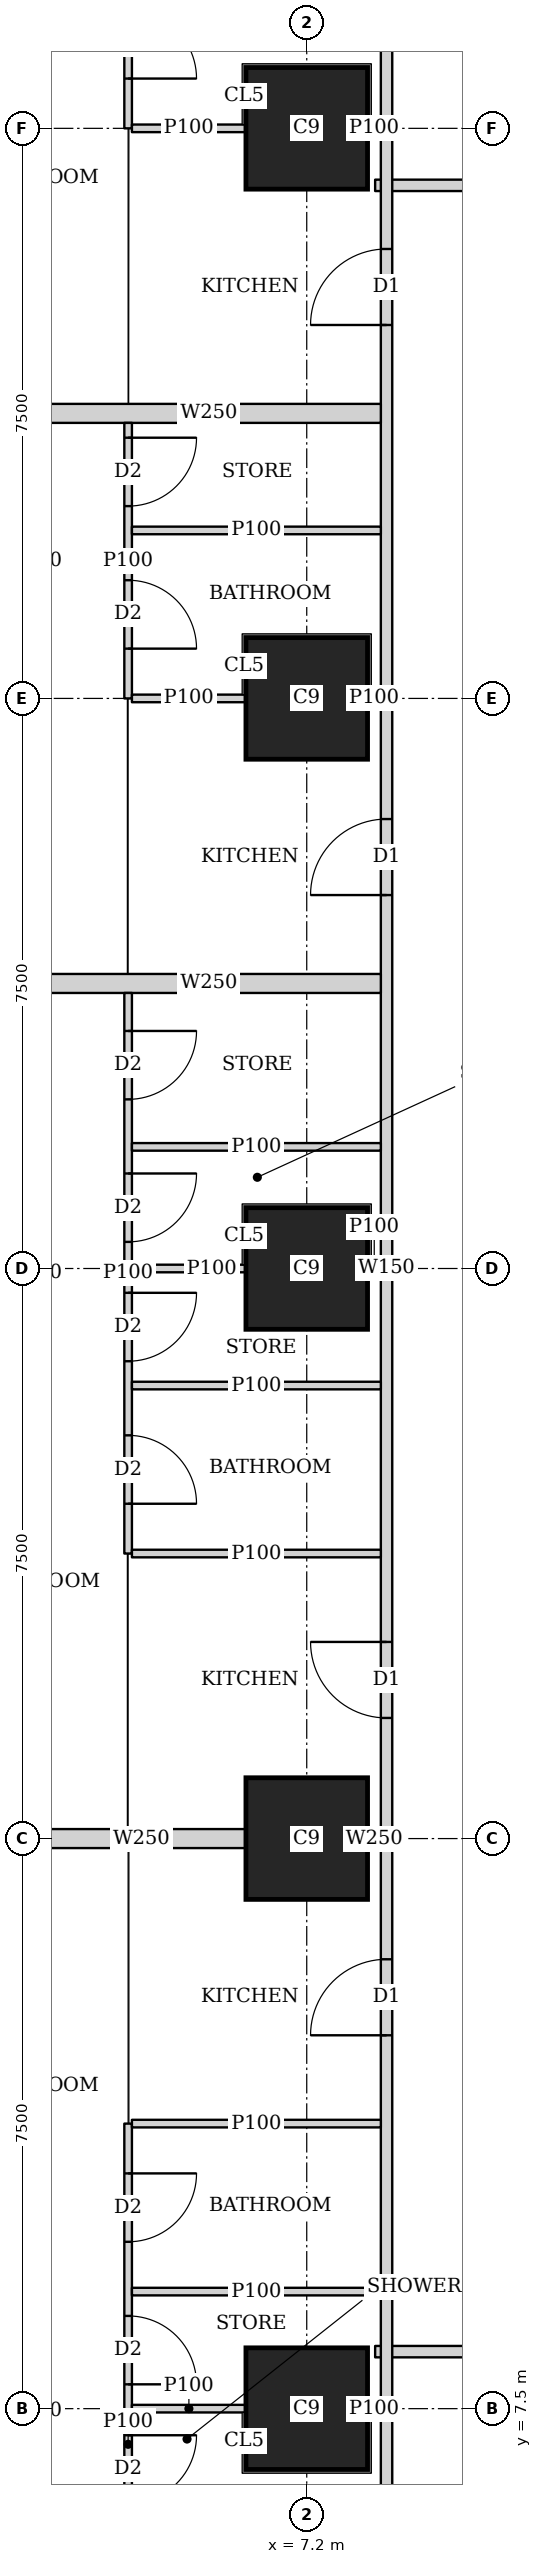
"""IFC4 building model, lengths in metres.
Left out: names, types, materials, properties, quantities, classifications, styles, units other than length and angle.
Written with IfcOpenShell. Run it as: python <this file> out.ifc"""

import sys

from ifc_helpers import new_model, si_unit, direction, frame, frame_2d, origin, origin_2d, place, context, subcontext, project, spatial, rectangle, extrude, element, fill, save


model = new_model("IFC4")
c1 = context("Model", 3, precision=1e-05, world=origin(), true_north=direction((0.0, 1.0)))
c2 = subcontext(c1, "Body", "Model", "MODEL_VIEW")
j1 = project(units=[si_unit("LENGTHUNIT", "METRE"), si_unit("PLANEANGLEUNIT", "RADIAN")], contexts=[c1])
p1 = place(None, origin())
s1 = spatial("IfcSite", under=j1, at=p1, CompositionType="ELEMENT")
p2 = place(p1, origin())
s2 = spatial("IfcBuilding", under=s1, at=p2, CompositionType="ELEMENT")
p3 = place(p2, frame((0.0, 0.0, 100.4)))
s3 = spatial("IfcBuildingStorey", under=s2, at=p3, CompositionType="ELEMENT", Elevation=100.4)
for number, where, z_axis, x_axis in (
    (1, (7.2, 7.5, 0.0), (0.0, 0.0, 1.0), (1.0, 0.0, 0.0)),
    (2, (7.2, 15.0, 0.0), (0.0, 0.0, 1.0), (1.0, 0.0, 0.0)),
    (3, (7.2, 22.5, 0.0), (0.0, 0.0, 1.0), (1.0, 0.0, 0.0)),
    (4, (7.2, 30.0, 0.0), (0.0, 0.0, 1.0), (1.0, 0.0, 0.0)),
    (5, (7.2, 37.5, 0.0), (0.0, 0.0, 1.0), (1.0, 0.0, 0.0)),
):
    element("IfcColumn", number, at=place(p3, frame(where, z_axis=z_axis, x_axis=x_axis)), inside=s3, PredefinedType="COLUMN", context=c2, shape_type="SweptSolid", body=[
        extrude(rectangle(XDim=1.6, YDim=1.6, at=origin_2d()), origin(), (0.0, 0.0, 1.0), 3.75),
    ])
p4 = place(p3, frame((8.25, 2.126, 0.0), z_axis=(0.0, 0.0, 1.0), x_axis=(0.0, 1.0, 0.0)))
e6 = element("IfcWall", 6, at=p4, inside=s3, PredefinedType="SOLIDWALL", context=c2, shape_type="SweptSolid", body=[
    extrude(rectangle(XDim=40.773, YDim=0.15, at=frame_2d((20.386, 0.0))), origin(), (0.0, 0.0, 1.0), 3.5),
])
p5 = place(p4, frame((10.286, 0.0, 0.0)))
e7 = element("IfcOpeningElement", 7, at=p5, cuts=e6, PredefinedType="OPENING", context=c2, shape_type="SweptSolid", body=[
    extrude(rectangle(XDim=1.0, YDim=2.1, at=frame_2d((0.5, 1.05))), frame((0.0, 0.085, 0.0), z_axis=(0.0, -1.0, 0.0), x_axis=(1.0, 0.0, 0.0)), (0.0, 0.0, 1.0), 0.17),
])
p6 = place(p4, frame((14.461, 0.0, 0.0)))
e8 = element("IfcOpeningElement", 8, at=p6, cuts=e6, PredefinedType="OPENING", context=c2, shape_type="SweptSolid", body=[
    extrude(rectangle(XDim=1.0, YDim=2.1, at=frame_2d((0.5, 1.05))), frame((0.0, 0.085, 0.0), z_axis=(0.0, -1.0, 0.0), x_axis=(1.0, 0.0, 0.0)), (0.0, 0.0, 1.0), 0.17),
])
p7 = place(p4, frame((25.287, 0.0, 0.0)))
e9 = element("IfcOpeningElement", 9, at=p7, cuts=e6, PredefinedType="OPENING", context=c2, shape_type="SweptSolid", body=[
    extrude(rectangle(XDim=1.0, YDim=2.1, at=frame_2d((0.5, 1.05))), frame((0.0, 0.085, 0.0), z_axis=(0.0, -1.0, 0.0), x_axis=(1.0, 0.0, 0.0)), (0.0, 0.0, 1.0), 0.17),
])
p8 = place(p4, frame((32.787, 0.0, 0.0)))
e10 = element("IfcOpeningElement", 10, at=p8, cuts=e6, PredefinedType="OPENING", context=c2, shape_type="SweptSolid", body=[
    extrude(rectangle(XDim=1.0, YDim=2.1, at=frame_2d((0.5, 1.05))), frame((0.0, 0.085, 0.0), z_axis=(0.0, -1.0, 0.0), x_axis=(1.0, 0.0, 0.0)), (0.0, 0.0, 1.0), 0.17),
])
p9 = place(p3, frame((13.599, 8.25, 0.0), z_axis=(0.0, 0.0, 1.0), x_axis=(-1.0, 0.0, 0.0)))
e11 = element("IfcWall", 11, at=p9, inside=s3, PredefinedType="SOLIDWALL", context=c2, shape_type="SweptSolid", body=[
    extrude(rectangle(XDim=5.499, YDim=0.15, at=frame_2d((2.75, 0.0))), origin(), (0.0, 0.0, 1.0), 3.5),
])
p10 = place(p9, frame((1.774, 0.0, 0.0)))
e12 = element("IfcOpeningElement", 12, at=p10, cuts=e11, PredefinedType="OPENING", context=c2, shape_type="SweptSolid", body=[
    extrude(rectangle(XDim=1.0, YDim=2.1, at=frame_2d((0.5, 1.05))), frame((0.0, 0.085, 0.0), z_axis=(0.0, -1.0, 0.0), x_axis=(1.0, 0.0, 0.0)), (0.0, 0.0, 1.0), 0.17),
])
p11 = place(p3, frame((8.1, 36.75, 0.0), z_axis=(0.0, 0.0, 1.0), x_axis=(1.0, 0.0, 0.0)))
e13 = element("IfcWall", 13, at=p11, inside=s3, PredefinedType="SOLIDWALL", context=c2, shape_type="SweptSolid", body=[
    extrude(rectangle(XDim=5.499, YDim=0.15, at=frame_2d((2.75, 0.0))), origin(), (0.0, 0.0, 1.0), 3.5),
])
p12 = place(p11, frame((2.725, 0.0, 0.0)))
e14 = element("IfcOpeningElement", 14, at=p12, cuts=e13, PredefinedType="OPENING", context=c2, shape_type="SweptSolid", body=[
    extrude(rectangle(XDim=1.0, YDim=2.1, at=frame_2d((0.5, 1.05))), frame((0.0, 0.085, 0.0), z_axis=(0.0, -1.0, 0.0), x_axis=(1.0, 0.0, 0.0)), (0.0, 0.0, 1.0), 0.17),
])
p13 = place(p3, frame((4.85, 2.812, 0.0), z_axis=(0.0, 0.0, 1.0), x_axis=(0.0, 1.0, 0.0)))
e15 = element("IfcWall", 15, at=p13, inside=s3, PredefinedType="PARTITIONING", context=c2, shape_type="SweptSolid", body=[
    extrude(rectangle(XDim=8.438, YDim=0.1, at=frame_2d((4.219, 0.0))), origin(), (0.0, 0.0, 1.0), 3.5),
])
p14 = place(p13, frame((6.883, 0.0, 0.0)))
e16 = element("IfcOpeningElement", 16, at=p14, cuts=e15, PredefinedType="OPENING", context=c2, shape_type="SweptSolid", body=[
    extrude(rectangle(XDim=0.9, YDim=2.1, at=frame_2d((0.45, 1.05))), frame((0.0, 0.06, 0.0), z_axis=(0.0, -1.0, 0.0), x_axis=(1.0, 0.0, 0.0)), (0.0, 0.0, 1.0), 0.12),
])
p15 = place(p13, frame((3.438, 0.0, 0.0)))
e17 = element("IfcOpeningElement", 17, at=p15, cuts=e15, PredefinedType="OPENING", context=c2, shape_type="SweptSolid", body=[
    extrude(rectangle(XDim=0.9, YDim=2.1, at=frame_2d((0.45, 1.05))), frame((0.0, 0.06, 0.0), z_axis=(0.0, -1.0, 0.0), x_axis=(1.0, 0.0, 0.0)), (0.0, 0.0, 1.0), 0.12),
])
p16 = place(p13, frame((5.008, 0.0, 0.0)))
e18 = element("IfcOpeningElement", 18, at=p16, cuts=e15, PredefinedType="OPENING", context=c2, shape_type="SweptSolid", body=[
    extrude(rectangle(XDim=0.9, YDim=2.1, at=frame_2d((0.45, 1.05))), frame((0.0, 0.06, 0.0), z_axis=(0.0, -1.0, 0.0), x_axis=(1.0, 0.0, 0.0)), (0.0, 0.0, 1.0), 0.12),
])
p17 = place(p13, frame((1.563, 0.0, 0.0)))
e19 = element("IfcOpeningElement", 19, at=p17, cuts=e15, PredefinedType="OPENING", context=c2, shape_type="SweptSolid", body=[
    extrude(rectangle(XDim=0.9, YDim=2.1, at=frame_2d((0.45, 1.05))), frame((0.0, 0.06, 0.0), z_axis=(0.0, -1.0, 0.0), x_axis=(1.0, 0.0, 0.0)), (0.0, 0.0, 1.0), 0.12),
])
p18 = place(p3, frame((4.9, 7.5, 0.0), z_axis=(0.0, 0.0, 1.0), x_axis=(1.0, 0.0, 0.0)))
e20 = element("IfcWall", 20, at=p18, inside=s3, PredefinedType="PARTITIONING", context=c2, shape_type="SweptSolid", body=[
    extrude(rectangle(XDim=1.499, YDim=0.1, at=frame_2d((0.75, 0.0))), origin(), (0.0, 0.0, 1.0), 3.5),
])
p19 = place(p3, frame((8.001, 7.5, 0.0), z_axis=(0.0, 0.0, 1.0), x_axis=(1.0, 0.0, 0.0)))
e21 = element("IfcWall", 21, at=p19, inside=s3, PredefinedType="PARTITIONING", context=c2, shape_type="SweptSolid", body=[
    extrude(rectangle(XDim=0.174, YDim=0.1, at=frame_2d((0.087, 0.0))), origin(), (0.0, 0.0, 1.0), 3.5),
])
for number, where, z_axis, x_axis in (
    (22, (4.9, 11.25, 0.0), (0.0, 0.0, 1.0), (1.0, 0.0, 0.0)),
    (23, (4.9, 9.04, 0.0), (0.0, 0.0, 1.0), (1.0, 0.0, 0.0)),
):
    element("IfcWall", number, at=place(p3, frame(where, z_axis=z_axis, x_axis=x_axis)), inside=s3, PredefinedType="PARTITIONING", context=c2, shape_type="SweptSolid", body=[
        extrude(rectangle(XDim=3.275, YDim=0.1, at=frame_2d((1.638, 0.0))), origin(), (0.0, 0.0, 1.0), 3.5),
    ])
p20 = place(p3, frame((4.85, 18.75, 0.0), z_axis=(0.0, 0.0, 1.0), x_axis=(0.0, 1.0, 0.0)))
e24 = element("IfcWall", 24, at=p20, inside=s3, PredefinedType="PARTITIONING", context=c2, shape_type="SweptSolid", body=[
    extrude(rectangle(XDim=7.375, YDim=0.1, at=frame_2d((3.688, 0.0))), origin(), (0.0, 0.0, 1.0), 3.5),
])
p21 = place(p20, frame((0.655, 0.0, 0.0)))
e25 = element("IfcOpeningElement", 25, at=p21, cuts=e24, PredefinedType="OPENING", context=c2, shape_type="SweptSolid", body=[
    extrude(rectangle(XDim=0.9, YDim=2.1, at=frame_2d((0.45, 1.05))), frame((0.0, 0.06, 0.0), z_axis=(0.0, -1.0, 0.0), x_axis=(1.0, 0.0, 0.0)), (0.0, 0.0, 1.0), 0.12),
])
p22 = place(p20, frame((4.1, 0.0, 0.0)))
e26 = element("IfcOpeningElement", 26, at=p22, cuts=e24, PredefinedType="OPENING", context=c2, shape_type="SweptSolid", body=[
    extrude(rectangle(XDim=0.9, YDim=2.1, at=frame_2d((0.45, 1.05))), frame((0.0, 0.06, 0.0), z_axis=(0.0, -1.0, 0.0), x_axis=(1.0, 0.0, 0.0)), (0.0, 0.0, 1.0), 0.12),
])
p23 = place(p20, frame((2.53, 0.0, 0.0)))
e27 = element("IfcOpeningElement", 27, at=p23, cuts=e24, PredefinedType="OPENING", context=c2, shape_type="SweptSolid", body=[
    extrude(rectangle(XDim=0.9, YDim=2.1, at=frame_2d((0.45, 1.05))), frame((0.0, 0.06, 0.0), z_axis=(0.0, -1.0, 0.0), x_axis=(1.0, 0.0, 0.0)), (0.0, 0.0, 1.0), 0.12),
])
p24 = place(p20, frame((5.975, 0.0, 0.0)))
e28 = element("IfcOpeningElement", 28, at=p24, cuts=e24, PredefinedType="OPENING", context=c2, shape_type="SweptSolid", body=[
    extrude(rectangle(XDim=0.9, YDim=2.1, at=frame_2d((0.45, 1.05))), frame((0.0, 0.06, 0.0), z_axis=(0.0, -1.0, 0.0), x_axis=(1.0, 0.0, 0.0)), (0.0, 0.0, 1.0), 0.12),
])
p25 = place(p3, frame((4.9, 18.75, 0.0), z_axis=(0.0, 0.0, 1.0), x_axis=(1.0, 0.0, 0.0)))
e29 = element("IfcWall", 29, at=p25, inside=s3, PredefinedType="PARTITIONING", context=c2, shape_type="SweptSolid", body=[
    extrude(rectangle(XDim=3.275, YDim=0.1, at=frame_2d((1.638, 0.0))), origin(), (0.0, 0.0, 1.0), 3.5),
])
p26 = place(p3, frame((4.9, 22.5, 0.0), z_axis=(0.0, 0.0, 1.0), x_axis=(1.0, 0.0, 0.0)))
e30 = element("IfcWall", 30, at=p26, inside=s3, PredefinedType="PARTITIONING", context=c2, shape_type="SweptSolid", body=[
    extrude(rectangle(XDim=1.499, YDim=0.1, at=frame_2d((0.75, 0.0))), origin(), (0.0, 0.0, 1.0), 3.5),
])
p27 = place(p3, frame((8.001, 22.5, 0.0), z_axis=(0.0, 0.0, 1.0), x_axis=(1.0, 0.0, 0.0)))
e31 = element("IfcWall", 31, at=p27, inside=s3, PredefinedType="PARTITIONING", context=c2, shape_type="SweptSolid", body=[
    extrude(rectangle(XDim=0.174, YDim=0.1, at=frame_2d((0.087, 0.0))), origin(), (0.0, 0.0, 1.0), 3.5),
])
for number, where, z_axis, x_axis in (
    (32, (4.9, 20.96, 0.0), (0.0, 0.0, 1.0), (1.0, 0.0, 0.0)),
    (33, (4.9, 24.1, 0.0), (0.0, 0.0, 1.0), (1.0, 0.0, 0.0)),
):
    element("IfcWall", number, at=place(p3, frame(where, z_axis=z_axis, x_axis=x_axis)), inside=s3, PredefinedType="PARTITIONING", context=c2, shape_type="SweptSolid", body=[
        extrude(rectangle(XDim=3.275, YDim=0.1, at=frame_2d((1.638, 0.0))), origin(), (0.0, 0.0, 1.0), 3.5),
    ])
p28 = place(p3, frame((3.65, 15.0, 0.0), z_axis=(0.0, 0.0, 1.0), x_axis=(1.0, 0.0, 0.0)))
e34 = element("IfcWall", 34, at=p28, inside=s3, PredefinedType="SOLIDWALL", context=c2, shape_type="SweptSolid", body=[
    extrude(rectangle(XDim=2.749, YDim=0.25, at=frame_2d((1.375, 0.0))), origin(), (0.0, 0.0, 1.0), 3.5),
])
p29 = place(p3, frame((8.001, 15.0, 0.0), z_axis=(0.0, 0.0, 1.0), x_axis=(1.0, 0.0, 0.0)))
e35 = element("IfcWall", 35, at=p29, inside=s3, PredefinedType="SOLIDWALL", context=c2, shape_type="SweptSolid", body=[
    extrude(rectangle(XDim=0.174, YDim=0.25, at=frame_2d((0.087, 0.0))), origin(), (0.0, 0.0, 1.0), 3.5),
])
p30 = place(p3, frame((4.85, 30.0, 0.0), z_axis=(0.0, 0.0, 1.0), x_axis=(0.0, 1.0, 0.0)))
e36 = element("IfcWall", 36, at=p30, inside=s3, PredefinedType="PARTITIONING", context=c2, shape_type="SweptSolid", body=[
    extrude(rectangle(XDim=3.625, YDim=0.1, at=frame_2d((1.812, 0.0))), origin(), (0.0, 0.0, 1.0), 3.5),
])
p31 = place(p30, frame((0.655, 0.0, 0.0)))
e37 = element("IfcOpeningElement", 37, at=p31, cuts=e36, PredefinedType="OPENING", context=c2, shape_type="SweptSolid", body=[
    extrude(rectangle(XDim=0.9, YDim=2.1, at=frame_2d((0.45, 1.05))), frame((0.0, 0.06, 0.0), z_axis=(0.0, -1.0, 0.0), x_axis=(1.0, 0.0, 0.0)), (0.0, 0.0, 1.0), 0.12),
])
p32 = place(p30, frame((2.53, 0.0, 0.0)))
e38 = element("IfcOpeningElement", 38, at=p32, cuts=e36, PredefinedType="OPENING", context=c2, shape_type="SweptSolid", body=[
    extrude(rectangle(XDim=0.9, YDim=2.1, at=frame_2d((0.45, 1.05))), frame((0.0, 0.06, 0.0), z_axis=(0.0, -1.0, 0.0), x_axis=(1.0, 0.0, 0.0)), (0.0, 0.0, 1.0), 0.12),
])
p33 = place(p3, frame((4.9, 30.0, 0.0), z_axis=(0.0, 0.0, 1.0), x_axis=(1.0, 0.0, 0.0)))
e39 = element("IfcWall", 39, at=p33, inside=s3, PredefinedType="PARTITIONING", context=c2, shape_type="SweptSolid", body=[
    extrude(rectangle(XDim=1.499, YDim=0.1, at=frame_2d((0.75, 0.0))), origin(), (0.0, 0.0, 1.0), 3.5),
])
p34 = place(p3, frame((8.001, 30.0, 0.0), z_axis=(0.0, 0.0, 1.0), x_axis=(1.0, 0.0, 0.0)))
e40 = element("IfcWall", 40, at=p34, inside=s3, PredefinedType="PARTITIONING", context=c2, shape_type="SweptSolid", body=[
    extrude(rectangle(XDim=0.174, YDim=0.1, at=frame_2d((0.087, 0.0))), origin(), (0.0, 0.0, 1.0), 3.5),
])
p35 = place(p3, frame((4.9, 32.21, 0.0), z_axis=(0.0, 0.0, 1.0), x_axis=(1.0, 0.0, 0.0)))
e41 = element("IfcWall", 41, at=p35, inside=s3, PredefinedType="PARTITIONING", context=c2, shape_type="SweptSolid", body=[
    extrude(rectangle(XDim=3.275, YDim=0.1, at=frame_2d((1.638, 0.0))), origin(), (0.0, 0.0, 1.0), 3.5),
])
p36 = place(p3, frame((3.65, 26.25, 0.0), z_axis=(0.0, 0.0, 1.0), x_axis=(1.0, 0.0, 0.0)))
e42 = element("IfcWall", 42, at=p36, inside=s3, PredefinedType="SOLIDWALL", context=c2, shape_type="SweptSolid", body=[
    extrude(rectangle(XDim=4.525, YDim=0.25, at=frame_2d((2.263, 0.0))), origin(), (0.0, 0.0, 1.0), 3.5),
])
p37 = place(p3, frame((4.85, 37.5, 0.0), z_axis=(0.0, 0.0, 1.0), x_axis=(0.0, 1.0, 0.0)))
e43 = element("IfcWall", 43, at=p37, inside=s3, PredefinedType="PARTITIONING", context=c2, shape_type="SweptSolid", body=[
    extrude(rectangle(XDim=4.699, YDim=0.1, at=frame_2d((2.35, 0.0))), origin(), (0.0, 0.0, 1.0), 3.5),
])
p38 = place(p37, frame((0.655, 0.0, 0.0)))
e44 = element("IfcOpeningElement", 44, at=p38, cuts=e43, PredefinedType="OPENING", context=c2, shape_type="SweptSolid", body=[
    extrude(rectangle(XDim=0.9, YDim=2.1, at=frame_2d((0.45, 1.05))), frame((0.0, 0.06, 0.0), z_axis=(0.0, -1.0, 0.0), x_axis=(1.0, 0.0, 0.0)), (0.0, 0.0, 1.0), 0.12),
])
p39 = place(p37, frame((2.53, 0.0, 0.0)))
e45 = element("IfcOpeningElement", 45, at=p39, cuts=e43, PredefinedType="OPENING", context=c2, shape_type="SweptSolid", body=[
    extrude(rectangle(XDim=0.9, YDim=2.1, at=frame_2d((0.45, 1.05))), frame((0.0, 0.06, 0.0), z_axis=(0.0, -1.0, 0.0), x_axis=(1.0, 0.0, 0.0)), (0.0, 0.0, 1.0), 0.12),
])
p40 = place(p3, frame((4.9, 37.5, 0.0), z_axis=(0.0, 0.0, 1.0), x_axis=(1.0, 0.0, 0.0)))
e46 = element("IfcWall", 46, at=p40, inside=s3, PredefinedType="PARTITIONING", context=c2, shape_type="SweptSolid", body=[
    extrude(rectangle(XDim=1.499, YDim=0.1, at=frame_2d((0.75, 0.0))), origin(), (0.0, 0.0, 1.0), 3.5),
])
p41 = place(p3, frame((8.001, 37.5, 0.0), z_axis=(0.0, 0.0, 1.0), x_axis=(1.0, 0.0, 0.0)))
e47 = element("IfcWall", 47, at=p41, inside=s3, PredefinedType="PARTITIONING", context=c2, shape_type="SweptSolid", body=[
    extrude(rectangle(XDim=0.174, YDim=0.1, at=frame_2d((0.087, 0.0))), origin(), (0.0, 0.0, 1.0), 3.5),
])
p42 = place(p3, frame((3.65, 33.75, 0.0), z_axis=(0.0, 0.0, 1.0), x_axis=(1.0, 0.0, 0.0)))
e48 = element("IfcWall", 48, at=p42, inside=s3, PredefinedType="SOLIDWALL", context=c2, shape_type="SweptSolid", body=[
    extrude(rectangle(XDim=4.525, YDim=0.25, at=frame_2d((2.263, 0.0))), origin(), (0.0, 0.0, 1.0), 3.5),
])
p43 = place(p14, origin())
e49 = element("IfcDoor", 49, at=p43, inside=s3, OperationType="SINGLE_SWING_LEFT", PredefinedType="DOOR", context=c2, shape_type="SweptSolid", body=[
    extrude(rectangle(XDim=0.9, YDim=2.1, at=frame_2d((0.45, 1.05))), frame((0.0, 0.025, 0.0), z_axis=(0.0, -1.0, 0.0), x_axis=(1.0, 0.0, 0.0)), (0.0, 0.0, 1.0), 0.05),
])
fill(e16, e49)
p44 = place(p15, origin())
e50 = element("IfcDoor", 50, at=p44, inside=s3, OperationType="SINGLE_SWING_LEFT", PredefinedType="DOOR", context=c2, shape_type="SweptSolid", body=[
    extrude(rectangle(XDim=0.9, YDim=2.1, at=frame_2d((0.45, 1.05))), frame((0.0, 0.025, 0.0), z_axis=(0.0, -1.0, 0.0), x_axis=(1.0, 0.0, 0.0)), (0.0, 0.0, 1.0), 0.05),
])
fill(e17, e50)
p45 = place(p16, origin())
e51 = element("IfcDoor", 51, at=p45, inside=s3, OperationType="SINGLE_SWING_RIGHT", PredefinedType="DOOR", context=c2, shape_type="SweptSolid", body=[
    extrude(rectangle(XDim=0.9, YDim=2.1, at=frame_2d((0.45, 1.05))), frame((0.0, 0.025, 0.0), z_axis=(0.0, -1.0, 0.0), x_axis=(1.0, 0.0, 0.0)), (0.0, 0.0, 1.0), 0.05),
])
fill(e18, e51)
p46 = place(p5, origin())
e52 = element("IfcDoor", 52, at=p46, inside=s3, OperationType="SINGLE_SWING_LEFT", PredefinedType="DOOR", context=c2, shape_type="SweptSolid", body=[
    extrude(rectangle(XDim=1.0, YDim=2.1, at=frame_2d((0.5, 1.05))), frame((0.0, 0.025, 0.0), z_axis=(0.0, -1.0, 0.0), x_axis=(1.0, 0.0, 0.0)), (0.0, 0.0, 1.0), 0.05),
])
fill(e7, e52)
p47 = place(p21, origin())
e53 = element("IfcDoor", 53, at=p47, inside=s3, OperationType="SINGLE_SWING_RIGHT", PredefinedType="DOOR", context=c2, shape_type="SweptSolid", body=[
    extrude(rectangle(XDim=0.9, YDim=2.1, at=frame_2d((0.45, 1.05))), frame((0.0, 0.025, 0.0), z_axis=(0.0, -1.0, 0.0), x_axis=(1.0, 0.0, 0.0)), (0.0, 0.0, 1.0), 0.05),
])
fill(e25, e53)
p48 = place(p22, origin())
e54 = element("IfcDoor", 54, at=p48, inside=s3, OperationType="SINGLE_SWING_LEFT", PredefinedType="DOOR", context=c2, shape_type="SweptSolid", body=[
    extrude(rectangle(XDim=0.9, YDim=2.1, at=frame_2d((0.45, 1.05))), frame((0.0, 0.025, 0.0), z_axis=(0.0, -1.0, 0.0), x_axis=(1.0, 0.0, 0.0)), (0.0, 0.0, 1.0), 0.05),
])
fill(e26, e54)
p49 = place(p23, origin())
e55 = element("IfcDoor", 55, at=p49, inside=s3, OperationType="SINGLE_SWING_LEFT", PredefinedType="DOOR", context=c2, shape_type="SweptSolid", body=[
    extrude(rectangle(XDim=0.9, YDim=2.1, at=frame_2d((0.45, 1.05))), frame((0.0, 0.025, 0.0), z_axis=(0.0, -1.0, 0.0), x_axis=(1.0, 0.0, 0.0)), (0.0, 0.0, 1.0), 0.05),
])
fill(e27, e55)
p50 = place(p24, origin())
e56 = element("IfcDoor", 56, at=p50, inside=s3, OperationType="SINGLE_SWING_LEFT", PredefinedType="DOOR", context=c2, shape_type="SweptSolid", body=[
    extrude(rectangle(XDim=0.9, YDim=2.1, at=frame_2d((0.45, 1.05))), frame((0.0, 0.025, 0.0), z_axis=(0.0, -1.0, 0.0), x_axis=(1.0, 0.0, 0.0)), (0.0, 0.0, 1.0), 0.05),
])
fill(e28, e56)
p51 = place(p6, origin())
e57 = element("IfcDoor", 57, at=p51, inside=s3, OperationType="SINGLE_SWING_RIGHT", PredefinedType="DOOR", context=c2, shape_type="SweptSolid", body=[
    extrude(rectangle(XDim=1.0, YDim=2.1, at=frame_2d((0.5, 1.05))), frame((0.0, 0.025, 0.0), z_axis=(0.0, -1.0, 0.0), x_axis=(1.0, 0.0, 0.0)), (0.0, 0.0, 1.0), 0.05),
])
fill(e8, e57)
p52 = place(p31, origin())
e58 = element("IfcDoor", 58, at=p52, inside=s3, OperationType="SINGLE_SWING_RIGHT", PredefinedType="DOOR", context=c2, shape_type="SweptSolid", body=[
    extrude(rectangle(XDim=0.9, YDim=2.1, at=frame_2d((0.45, 1.05))), frame((0.0, 0.025, 0.0), z_axis=(0.0, -1.0, 0.0), x_axis=(1.0, 0.0, 0.0)), (0.0, 0.0, 1.0), 0.05),
])
fill(e37, e58)
p53 = place(p32, origin())
e59 = element("IfcDoor", 59, at=p53, inside=s3, OperationType="SINGLE_SWING_LEFT", PredefinedType="DOOR", context=c2, shape_type="SweptSolid", body=[
    extrude(rectangle(XDim=0.9, YDim=2.1, at=frame_2d((0.45, 1.05))), frame((0.0, 0.025, 0.0), z_axis=(0.0, -1.0, 0.0), x_axis=(1.0, 0.0, 0.0)), (0.0, 0.0, 1.0), 0.05),
])
fill(e38, e59)
p54 = place(p7, origin())
e60 = element("IfcDoor", 60, at=p54, inside=s3, OperationType="SINGLE_SWING_LEFT", PredefinedType="DOOR", context=c2, shape_type="SweptSolid", body=[
    extrude(rectangle(XDim=1.0, YDim=2.1, at=frame_2d((0.5, 1.05))), frame((0.0, 0.025, 0.0), z_axis=(0.0, -1.0, 0.0), x_axis=(1.0, 0.0, 0.0)), (0.0, 0.0, 1.0), 0.05),
])
fill(e9, e60)
p55 = place(p38, origin())
e61 = element("IfcDoor", 61, at=p55, inside=s3, OperationType="SINGLE_SWING_RIGHT", PredefinedType="DOOR", context=c2, shape_type="SweptSolid", body=[
    extrude(rectangle(XDim=0.9, YDim=2.1, at=frame_2d((0.45, 1.05))), frame((0.0, 0.025, 0.0), z_axis=(0.0, -1.0, 0.0), x_axis=(1.0, 0.0, 0.0)), (0.0, 0.0, 1.0), 0.05),
])
fill(e44, e61)
p56 = place(p8, origin())
e62 = element("IfcDoor", 62, at=p56, inside=s3, OperationType="SINGLE_SWING_LEFT", PredefinedType="DOOR", context=c2, shape_type="SweptSolid", body=[
    extrude(rectangle(XDim=1.0, YDim=2.1, at=frame_2d((0.5, 1.05))), frame((0.0, 0.025, 0.0), z_axis=(0.0, -1.0, 0.0), x_axis=(1.0, 0.0, 0.0)), (0.0, 0.0, 1.0), 0.05),
])
fill(e10, e62)
save(model, sys.argv[1])
